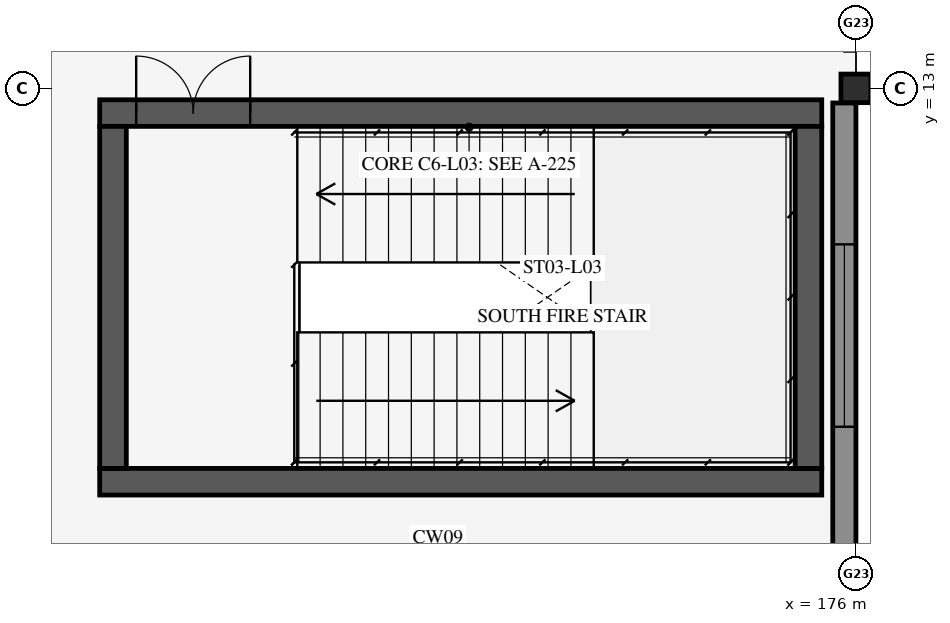
"""IFC4 building model, lengths in metres.
Left out: names, types, materials, properties, quantities, classifications, styles, units other than length and angle.
Written with IfcOpenShell. Run it as: python <this file> out.ifc"""

import sys

from ifc_helpers import new_model, si_unit, direction, frame, frame_2d, origin, origin_2d, place, context, subcontext, project, spatial, rectangle, i_section, extrude, element, fill, save


model = new_model("IFC4")
c1 = context("Model", 3, precision=1e-05, world=origin(), true_north=direction((0.0, 1.0)))
c2 = subcontext(c1, "Body", "Model", "MODEL_VIEW")
j1 = project(units=[si_unit("LENGTHUNIT", "METRE"), si_unit("PLANEANGLEUNIT", "RADIAN")], contexts=[c1])
p1 = place(None, origin())
s1 = spatial("IfcSite", under=j1, at=p1, CompositionType="ELEMENT")
p2 = place(p1, origin())
s2 = spatial("IfcBuilding", under=s1, at=p2, CompositionType="ELEMENT")
p3 = place(p2, frame((0.0, 0.0, 14.8)))
s3 = spatial("IfcBuildingStorey", under=s2, at=p3, CompositionType="ELEMENT", Elevation=14.8)
p4 = place(p3, frame((166.05, 7.825, 0.0), z_axis=(0.0, 0.0, 1.0), x_axis=(1.0, 0.0, 0.0)))
e1 = element("IfcWall", 1, at=p4, inside=s3, PredefinedType="SHEAR", context=c2, shape_type="SweptSolid", body=[
    extrude(rectangle(XDim=9.5, YDim=0.35, at=frame_2d((4.75, 0.0))), origin(), (0.0, 0.0, 1.0), 4.0),
])
p5 = place(p3, frame((166.05, 12.675, 0.0), z_axis=(0.0, 0.0, 1.0), x_axis=(1.0, 0.0, 0.0)))
e2 = element("IfcWall", 2, at=p5, inside=s3, PredefinedType="SHEAR", context=c2, shape_type="SweptSolid", body=[
    extrude(rectangle(XDim=9.5, YDim=0.35, at=frame_2d((4.75, 0.0))), origin(), (0.0, 0.0, 1.0), 4.0),
])
p6 = place(p5, frame((0.48, 0.0, 0.0)))
e3 = element("IfcOpeningElement", 3, at=p6, cuts=e2, PredefinedType="OPENING", context=c2, shape_type="SweptSolid", body=[
    extrude(rectangle(XDim=1.5, YDim=2.3, at=frame_2d((0.75, 1.15))), frame((0.0, 0.187, 0.0), z_axis=(0.0, -1.0, 0.0), x_axis=(1.0, 0.0, 0.0)), (0.0, 0.0, 1.0), 0.374),
])
for number, where, z_axis, x_axis in (
    (4, (166.225, 8.0, 0.0), (0.0, 0.0, 1.0), (0.0, 1.0, 0.0)),
    (5, (175.375, 8.0, 0.0), (0.0, 0.0, 1.0), (0.0, 1.0, 0.0)),
):
    element("IfcWall", number, at=place(p3, frame(where, z_axis=z_axis, x_axis=x_axis)), inside=s3, PredefinedType="SHEAR", context=c2, shape_type="SweptSolid", body=[
        extrude(rectangle(XDim=4.5, YDim=0.35, at=frame_2d((2.25, 0.0))), origin(), (0.0, 0.0, 1.0), 4.0),
    ])
p7 = place(p3, frame((176.0, 13.0, 0.0), z_axis=(0.0, 0.0, 1.0), x_axis=(1.0, 0.0, 0.0)))
e6 = element("IfcColumn", 6, at=p7, inside=s3, PredefinedType="COLUMN", context=c2, shape_type="SweptSolid", body=[
    extrude(i_section(OverallWidth=0.394, OverallDepth=0.376, WebThickness=0.017, FlangeThickness=0.028, FilletRadius=0.014, at=origin_2d()), origin(), (0.0, 0.0, 1.0), 4.82),
])
p8 = place(p3, frame((175.847, 6.688, 0.0), z_axis=(0.0, 0.0, 1.0), x_axis=(0.0, 1.0, 0.0)))
e7 = element("IfcWall", 7, at=p8, inside=s3, PredefinedType="SOLIDWALL", context=c2, shape_type="SweptSolid", body=[
    extrude(rectangle(XDim=6.12, YDim=0.305, at=frame_2d((3.06, 0.0))), origin(), (0.0, 0.0, 1.0), 4.05),
])
p9 = place(p8, frame((1.86, 0.0, 0.95)))
e8 = element("IfcOpeningElement", 8, at=p9, cuts=e7, PredefinedType="OPENING", context=c2, shape_type="SweptSolid", body=[
    extrude(rectangle(XDim=2.4, YDim=2.1, at=frame_2d((1.2, 1.05))), frame((0.0, 0.165, 0.0), z_axis=(0.0, -1.0, 0.0), x_axis=(1.0, 0.0, 0.0)), (0.0, 0.0, 1.0), 0.329),
])
p10 = place(p6, frame((1.5, 0.0, 0.0), z_axis=(0.0, 0.0, 1.0), x_axis=(-1.0, 0.0, 0.0)))
e9 = element("IfcDoor", 9, at=p10, inside=s3, OperationType="DOUBLE_DOOR_SINGLE_SWING", PredefinedType="DOOR", context=c2, shape_type="SweptSolid", body=[
    extrude(rectangle(XDim=1.5, YDim=2.3, at=frame_2d((0.75, 1.15))), frame((0.0, 0.025, 0.0), z_axis=(0.0, -1.0, 0.0), x_axis=(1.0, 0.0, 0.0)), (0.0, 0.0, 1.0), 0.05),
])
fill(e3, e9)
p11 = place(p9, origin())
e10 = element("IfcWindow", 10, at=p11, inside=s3, PartitioningType="SINGLE_PANEL", PredefinedType="WINDOW", context=c2, shape_type="SweptSolid", body=[
    extrude(rectangle(XDim=2.4, YDim=2.1, at=frame_2d((1.2, 1.05))), frame((0.0, 0.03, 0.0), z_axis=(0.0, -1.0, 0.0), x_axis=(1.0, 0.0, 0.0)), (0.0, 0.0, 1.0), 0.06),
])
fill(e8, e10)
save(model, sys.argv[1])
